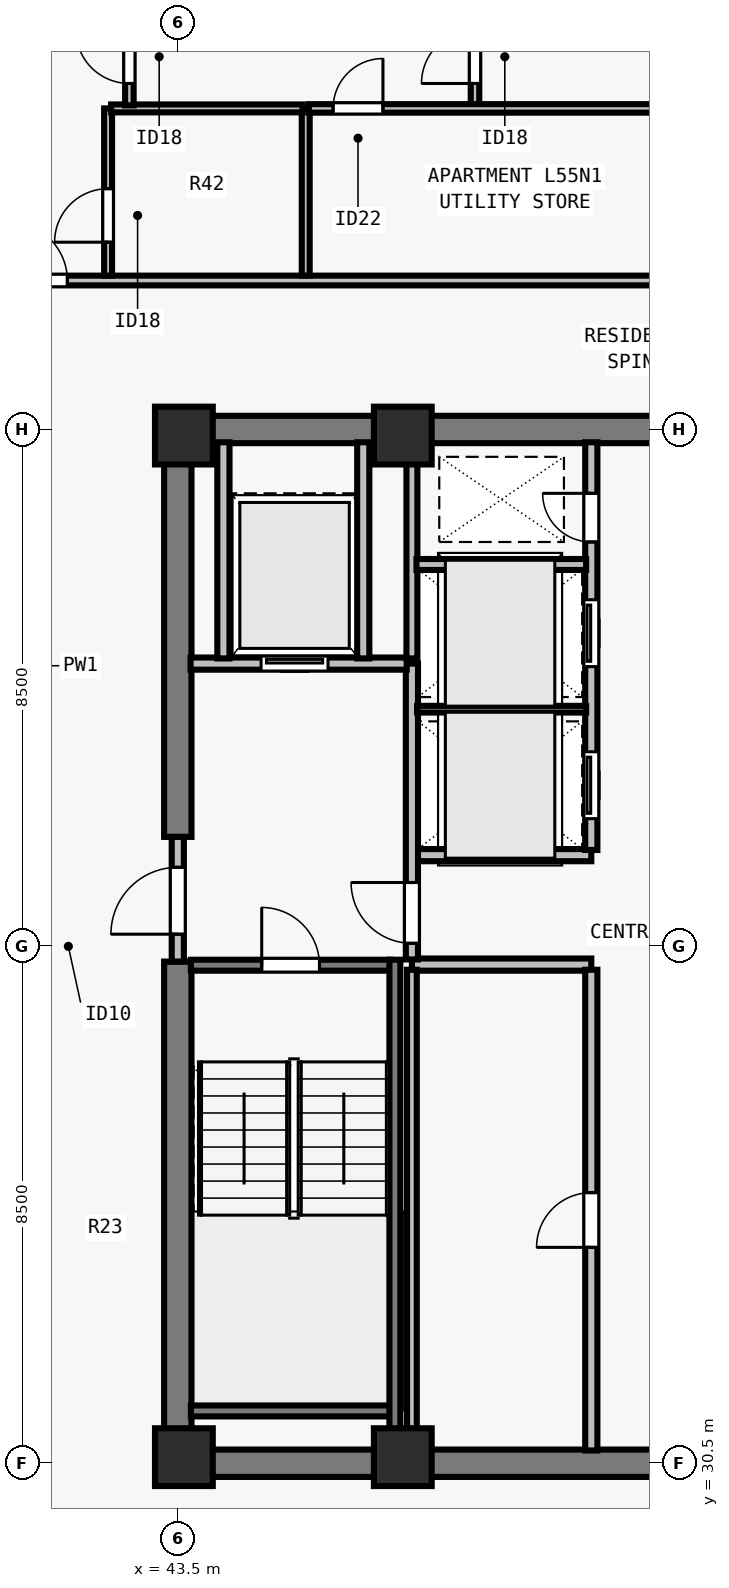
"""IFC4 building model, lengths in metres.
Left out: names, types, materials, properties, quantities, classifications, styles, units other than length and angle.
Written with IfcOpenShell. Run it as: python <this file> out.ifc"""

import sys

from ifc_helpers import new_model, si_unit, direction, frame, frame_2d, origin, origin_2d, place, context, subcontext, project, spatial, rectangle, extrude, element, fill, save


model = new_model("IFC4")
c1 = context("Model", 3, precision=1e-05, world=origin(), true_north=direction((0.0, 1.0)))
c2 = subcontext(c1, "Body", "Model", "MODEL_VIEW")
j1 = project(units=[si_unit("LENGTHUNIT", "METRE"), si_unit("PLANEANGLEUNIT", "RADIAN")], contexts=[c1])
p1 = place(None, origin())
s1 = spatial("IfcSite", under=j1, at=p1, CompositionType="ELEMENT")
p2 = place(p1, origin())
s2 = spatial("IfcBuilding", under=s1, at=p2, CompositionType="ELEMENT")
p3 = place(p2, frame((0.0, 0.0, 202.5)))
s3 = spatial("IfcBuildingStorey", under=s2, at=p3, CompositionType="ELEMENT", Elevation=202.5)
for number, where, z_axis, x_axis in (
    (1, (43.6, 30.6, 0.0), (0.0, 0.0, 1.0), (1.0, 0.0, 0.0)),
    (2, (47.2, 30.6, 0.0), (0.0, 0.0, 1.0), (1.0, 0.0, 0.0)),
    (3, (43.6, 47.4, 0.0), (0.0, 0.0, 1.0), (1.0, 0.0, 0.0)),
    (4, (47.2, 47.4, 0.0), (0.0, 0.0, 1.0), (1.0, 0.0, 0.0)),
):
    element("IfcColumn", number, at=place(p3, frame(where, z_axis=z_axis, x_axis=x_axis)), inside=s3, PredefinedType="COLUMN", context=c2, shape_type="SweptSolid", body=[
        extrude(rectangle(XDim=0.95, YDim=0.95, at=origin_2d()), origin(), (0.0, 0.0, 1.0), 3.5),
    ])
for number, where, z_axis, x_axis in (
    (5, (43.275, 30.5, 0.0), (0.0, 0.0, 1.0), (1.0, 0.0, 0.0)),
    (6, (43.275, 47.5, 0.0), (0.0, 0.0, 1.0), (1.0, 0.0, 0.0)),
):
    element("IfcWall", number, at=place(p3, frame(where, z_axis=z_axis, x_axis=x_axis)), inside=s3, PredefinedType="SHEAR", context=c2, shape_type="SweptSolid", body=[
        extrude(rectangle(XDim=17.45, YDim=0.45, at=frame_2d((8.725, 0.0))), origin(), (0.0, 0.0, 1.0), 3.29),
    ])
p4 = place(p3, frame((43.5, 30.715, 0.0), z_axis=(0.0, 0.0, 1.0), x_axis=(0.0, 1.0, 0.0)))
e7 = element("IfcWall", 7, at=p4, inside=s3, PredefinedType="SHEAR", context=c2, shape_type="SweptSolid", body=[
    extrude(rectangle(XDim=8.035, YDim=0.45, at=frame_2d((4.018, 0.0))), origin(), (0.0, 0.0, 1.0), 3.29),
])
p5 = place(p3, frame((43.5, 40.8, 0.0), z_axis=(0.0, 0.0, 1.0), x_axis=(0.0, 1.0, 0.0)))
e8 = element("IfcWall", 8, at=p5, inside=s3, PredefinedType="SHEAR", context=c2, shape_type="SweptSolid", body=[
    extrude(rectangle(XDim=6.485, YDim=0.45, at=frame_2d((3.242, 0.0))), origin(), (0.0, 0.0, 1.0), 3.29),
])
for number, where, z_axis, x_axis in (
    (9, (47.35, 38.7, 0.0), (0.0, 0.0, 1.0), (1.0, 0.0, 0.0)),
    (10, (47.35, 40.5, 0.0), (0.0, 0.0, 1.0), (1.0, 0.0, 0.0)),
):
    element("IfcWall", number, at=place(p3, frame(where, z_axis=z_axis, x_axis=x_axis)), inside=s3, PredefinedType="SOLIDWALL", context=c2, shape_type="SweptSolid", body=[
        extrude(rectangle(XDim=2.95, YDim=0.2, at=frame_2d((1.475, 0.0))), origin(), (0.0, 0.0, 1.0), 3.29),
    ])
p6 = place(p3, frame((50.3, 30.71, 0.0), z_axis=(0.0, 0.0, 1.0), x_axis=(0.0, 1.0, 0.0)))
e11 = element("IfcWall", 11, at=p6, inside=s3, PredefinedType="SOLIDWALL", context=c2, shape_type="SweptSolid", body=[
    extrude(rectangle(XDim=7.905, YDim=0.2, at=frame_2d((3.953, 0.0))), origin(), (0.0, 0.0, 1.0), 3.29),
])
p7 = place(p6, frame((3.34, 0.0, 0.0)))
e12 = element("IfcOpeningElement", 12, at=p7, cuts=e11, PredefinedType="OPENING", context=c2, shape_type="SweptSolid", body=[
    extrude(rectangle(XDim=0.9, YDim=2.12, at=frame_2d((0.45, 1.06))), frame((0.0, 0.11, 0.0), z_axis=(0.0, -1.0, 0.0), x_axis=(1.0, 0.0, 0.0)), (0.0, 0.0, 1.0), 0.22),
])
p8 = place(p3, frame((50.3, 40.585, 0.0), z_axis=(0.0, 0.0, 1.0), x_axis=(0.0, 1.0, 0.0)))
e13 = element("IfcWall", 13, at=p8, inside=s3, PredefinedType="SOLIDWALL", context=c2, shape_type="SweptSolid", body=[
    extrude(rectangle(XDim=6.705, YDim=0.2, at=frame_2d((3.353, 0.0))), origin(), (0.0, 0.0, 1.0), 3.29),
])
p9 = place(p8, frame((0.515, 0.0, 0.0)))
e14 = element("IfcOpeningElement", 14, at=p9, cuts=e13, PredefinedType="OPENING", context=c2, shape_type="SweptSolid", body=[
    extrude(rectangle(XDim=1.1, YDim=2.2, at=frame_2d((0.55, 1.1))), frame((0.0, 0.11, 0.0), z_axis=(0.0, -1.0, 0.0), x_axis=(1.0, 0.0, 0.0)), (0.0, 0.0, 1.0), 0.22),
])
p10 = place(p8, frame((3.015, 0.0, 0.0)))
e15 = element("IfcOpeningElement", 15, at=p10, cuts=e13, PredefinedType="OPENING", context=c2, shape_type="SweptSolid", body=[
    extrude(rectangle(XDim=1.1, YDim=2.2, at=frame_2d((0.55, 1.1))), frame((0.0, 0.11, 0.0), z_axis=(0.0, -1.0, 0.0), x_axis=(1.0, 0.0, 0.0)), (0.0, 0.0, 1.0), 0.22),
])
p11 = place(p8, frame((5.065, 0.0, 0.0)))
e16 = element("IfcOpeningElement", 16, at=p11, cuts=e13, PredefinedType="OPENING", context=c2, shape_type="SweptSolid", body=[
    extrude(rectangle(XDim=0.8, YDim=2.08, at=frame_2d((0.4, 1.04))), frame((0.0, 0.11, 0.0), z_axis=(0.0, -1.0, 0.0), x_axis=(1.0, 0.0, 0.0)), (0.0, 0.0, 1.0), 0.22),
])
p12 = place(p3, frame((43.5, 38.75, 0.0), z_axis=(0.0, 0.0, 1.0), x_axis=(0.0, 1.0, 0.0)))
e17 = element("IfcWall", 17, at=p12, inside=s3, PredefinedType="SOLIDWALL", context=c2, shape_type="SweptSolid", body=[
    extrude(rectangle(XDim=2.05, YDim=0.2, at=frame_2d((1.025, 0.0))), origin(), (0.0, 0.0, 1.0), 3.29),
])
p13 = place(p12, frame((0.45, 0.0, 0.0)))
e18 = element("IfcOpeningElement", 18, at=p13, cuts=e17, PredefinedType="OPENING", context=c2, shape_type="SweptSolid", body=[
    extrude(rectangle(XDim=1.1, YDim=2.15, at=frame_2d((0.55, 1.075))), frame((0.0, 0.11, 0.0), z_axis=(0.0, -1.0, 0.0), x_axis=(1.0, 0.0, 0.0)), (0.0, 0.0, 1.0), 0.22),
])
p14 = place(p3, frame((47.35, 38.785, 0.0), z_axis=(0.0, 0.0, 1.0), x_axis=(0.0, 1.0, 0.0)))
e19 = element("IfcWall", 19, at=p14, inside=s3, PredefinedType="SOLIDWALL", context=c2, shape_type="SweptSolid", body=[
    extrude(rectangle(XDim=4.865, YDim=0.2, at=frame_2d((2.433, 0.0))), origin(), (0.0, 0.0, 1.0), 3.29),
])
p15 = place(p14, frame((0.265, 0.0, 0.0)))
e20 = element("IfcOpeningElement", 20, at=p15, cuts=e19, PredefinedType="OPENING", context=c2, shape_type="SweptSolid", body=[
    extrude(rectangle(XDim=1.0, YDim=2.15, at=frame_2d((0.5, 1.075))), frame((0.0, 0.11, 0.0), z_axis=(0.0, -1.0, 0.0), x_axis=(1.0, 0.0, 0.0)), (0.0, 0.0, 1.0), 0.22),
])
p16 = place(p3, frame((43.71, 43.65, 0.0), z_axis=(0.0, 0.0, 1.0), x_axis=(1.0, 0.0, 0.0)))
e21 = element("IfcWall", 21, at=p16, inside=s3, PredefinedType="SOLIDWALL", context=c2, shape_type="SweptSolid", body=[
    extrude(rectangle(XDim=3.555, YDim=0.2, at=frame_2d((1.777, 0.0))), origin(), (0.0, 0.0, 1.0), 3.29),
])
p17 = place(p16, frame((1.16, 0.0, 0.0)))
e22 = element("IfcOpeningElement", 22, at=p17, cuts=e21, PredefinedType="OPENING", context=c2, shape_type="SweptSolid", body=[
    extrude(rectangle(XDim=1.1, YDim=2.2, at=frame_2d((0.55, 1.1))), frame((0.0, 0.11, 0.0), z_axis=(0.0, -1.0, 0.0), x_axis=(1.0, 0.0, 0.0)), (0.0, 0.0, 1.0), 0.22),
])
for number, where, z_axis, x_axis in (
    (23, (46.55, 43.735, 0.0), (0.0, 0.0, 1.0), (0.0, 1.0, 0.0)),
    (24, (44.25, 43.735, 0.0), (0.0, 0.0, 1.0), (0.0, 1.0, 0.0)),
):
    element("IfcWall", number, at=place(p3, frame(where, z_axis=z_axis, x_axis=x_axis)), inside=s3, PredefinedType="SOLIDWALL", context=c2, shape_type="SweptSolid", body=[
        extrude(rectangle(XDim=3.555, YDim=0.2, at=frame_2d((1.777, 0.0))), origin(), (0.0, 0.0, 1.0), 3.29),
    ])
p18 = place(p3, frame((47.35, 30.71, 0.0), z_axis=(0.0, 0.0, 1.0), x_axis=(0.0, 1.0, 0.0)))
e25 = element("IfcWall", 25, at=p18, inside=s3, PredefinedType="PARTITIONING", context=c2, shape_type="SweptSolid", body=[
    extrude(rectangle(XDim=7.905, YDim=0.16, at=frame_2d((3.953, 0.0))), origin(), (0.0, 0.0, 1.0), 3.29),
])
p19 = place(p3, frame((47.35, 43.735, 0.0), z_axis=(0.0, 0.0, 1.0), x_axis=(0.0, 1.0, 0.0)))
e26 = element("IfcWall", 26, at=p19, inside=s3, PredefinedType="SOLIDWALL", context=c2, shape_type="SweptSolid", body=[
    extrude(rectangle(XDim=3.555, YDim=0.18, at=frame_2d((1.777, 0.0))), origin(), (0.0, 0.0, 1.0), 3.29),
])
p20 = place(p3, frame((47.435, 42.9, 0.0), z_axis=(0.0, 0.0, 1.0), x_axis=(1.0, 0.0, 0.0)))
e27 = element("IfcWall", 27, at=p20, inside=s3, PredefinedType="PARTITIONING", context=c2, shape_type="SweptSolid", body=[
    extrude(rectangle(XDim=2.78, YDim=0.11, at=frame_2d((1.39, 0.0))), origin(), (0.0, 0.0, 1.0), 3.29),
])
p21 = place(p3, frame((47.425, 45.28, 0.0), z_axis=(0.0, 0.0, 1.0), x_axis=(1.0, 0.0, 0.0)))
e28 = element("IfcWall", 28, at=p21, inside=s3, PredefinedType="SOLIDWALL", context=c2, shape_type="SweptSolid", body=[
    extrude(rectangle(XDim=2.79, YDim=0.18, at=frame_2d((1.395, 0.0))), origin(), (0.0, 0.0, 1.0), 3.29),
])
p22 = place(p3, frame((29.805, 49.95, 0.0), z_axis=(0.0, 0.0, 1.0), x_axis=(1.0, 0.0, 0.0)))
e29 = element("IfcWall", 29, at=p22, inside=s3, PredefinedType="PARTITIONING", context=c2, shape_type="SweptSolid", body=[
    extrude(rectangle(XDim=44.39, YDim=0.16, at=frame_2d((22.195, 0.0))), origin(), (0.0, 0.0, 1.0), 2.958),
])
p23 = place(p22, frame((10.919, 0.0, 0.0)))
e30 = element("IfcOpeningElement", 30, at=p23, cuts=e29, PredefinedType="OPENING", context=c2, shape_type="SweptSolid", body=[
    extrude(rectangle(XDim=0.96, YDim=2.18, at=frame_2d((0.48, 1.09))), frame((0.0, 0.09, 0.0), z_axis=(0.0, -1.0, 0.0), x_axis=(1.0, 0.0, 0.0)), (0.0, 0.0, 1.0), 0.18),
])
p24 = place(p22, frame((32.999, 0.0, 0.0)))
e31 = element("IfcOpeningElement", 31, at=p24, cuts=e29, PredefinedType="OPENING", context=c2, shape_type="SweptSolid", body=[
    extrude(rectangle(XDim=0.96, YDim=2.18, at=frame_2d((0.48, 1.09))), frame((0.0, 0.09, 0.0), z_axis=(0.0, -1.0, 0.0), x_axis=(1.0, 0.0, 0.0)), (0.0, 0.0, 1.0), 0.18),
])
p25 = place(p3, frame((45.604, 50.03, 0.0), z_axis=(0.0, 0.0, 1.0), x_axis=(0.0, 1.0, 0.0)))
e32 = element("IfcWall", 32, at=p25, inside=s3, PredefinedType="PLUMBINGWALL", context=c2, shape_type="SweptSolid", body=[
    extrude(rectangle(XDim=2.75, YDim=0.13, at=frame_2d((1.375, 0.0))), origin(), (0.0, 0.0, 1.0), 3.29),
])
p26 = place(p3, frame((42.354, 50.03, 0.0), z_axis=(0.0, 0.0, 1.0), x_axis=(0.0, 1.0, 0.0)))
e33 = element("IfcWall", 33, at=p26, inside=s3, PredefinedType="PLUMBINGWALL", context=c2, shape_type="SweptSolid", body=[
    extrude(rectangle(XDim=2.75, YDim=0.13, at=frame_2d((1.375, 0.0))), origin(), (0.0, 0.0, 1.0), 3.29),
])
p27 = place(p26, frame((0.55, 0.0, 0.0)))
e34 = element("IfcOpeningElement", 34, at=p27, cuts=e33, PredefinedType="OPENING", context=c2, shape_type="SweptSolid", body=[
    extrude(rectangle(XDim=0.88, YDim=2.1, at=frame_2d((0.44, 1.05))), frame((0.0, 0.075, 0.0), z_axis=(0.0, -1.0, 0.0), x_axis=(1.0, 0.0, 0.0)), (0.0, 0.0, 1.0), 0.15),
])
p28 = place(p3, frame((42.404, 52.78, 0.0), z_axis=(0.0, 0.0, 1.0), x_axis=(1.0, 0.0, 0.0)))
e35 = element("IfcWall", 35, at=p28, inside=s3, PredefinedType="PLUMBINGWALL", context=c2, shape_type="SweptSolid", body=[
    extrude(rectangle(XDim=3.15, YDim=0.13, at=frame_2d((1.575, 0.0))), origin(), (0.0, 0.0, 1.0), 3.29),
])
p29 = place(p3, frame((48.387, 52.74, 0.0), z_axis=(0.0, 0.0, 1.0), x_axis=(0.0, 1.0, 0.0)))
e36 = element("IfcWall", 36, at=p29, inside=s3, PredefinedType="PARTITIONING", context=c2, shape_type="SweptSolid", body=[
    extrude(rectangle(XDim=8.38, YDim=0.14, at=frame_2d((4.19, 0.0))), origin(), (0.0, 0.0, 1.0), 3.29),
])
p30 = place(p29, frame((0.45, 0.0, 0.0)))
e37 = element("IfcOpeningElement", 37, at=p30, cuts=e36, PredefinedType="OPENING", context=c2, shape_type="SweptSolid", body=[
    extrude(rectangle(XDim=0.88, YDim=2.1, at=frame_2d((0.44, 1.05))), frame((0.0, 0.08, 0.0), z_axis=(0.0, -1.0, 0.0), x_axis=(1.0, 0.0, 0.0)), (0.0, 0.0, 1.0), 0.16),
])
p31 = place(p3, frame((45.654, 52.78, 0.0), z_axis=(0.0, 0.0, 1.0), x_axis=(1.0, 0.0, 0.0)))
e38 = element("IfcWall", 38, at=p31, inside=s3, PredefinedType="PARTITIONING", context=c2, shape_type="SweptSolid", body=[
    extrude(rectangle(XDim=6.884, YDim=0.14, at=frame_2d((3.442, 0.0))), origin(), (0.0, 0.0, 1.0), 3.29),
])
p32 = place(p31, frame((0.4, 0.0, 0.0)))
e39 = element("IfcOpeningElement", 39, at=p32, cuts=e38, PredefinedType="OPENING", context=c2, shape_type="SweptSolid", body=[
    extrude(rectangle(XDim=0.82, YDim=2.1, at=frame_2d((0.41, 1.05))), frame((0.0, 0.08, 0.0), z_axis=(0.0, -1.0, 0.0), x_axis=(1.0, 0.0, 0.0)), (0.0, 0.0, 1.0), 0.16),
])
p33 = place(p3, frame((42.704, 52.83, 0.0), z_axis=(0.0, 0.0, 1.0), x_axis=(0.0, 1.0, 0.0)))
e40 = element("IfcWall", 40, at=p33, inside=s3, PredefinedType="PARTITIONING", context=c2, shape_type="SweptSolid", body=[
    extrude(rectangle(XDim=8.29, YDim=0.14, at=frame_2d((4.145, 0.0))), origin(), (0.0, 0.0, 1.0), 3.29),
])
p34 = place(p33, frame((0.36, 0.0, 0.0)))
e41 = element("IfcOpeningElement", 41, at=p34, cuts=e40, PredefinedType="OPENING", context=c2, shape_type="SweptSolid", body=[
    extrude(rectangle(XDim=0.88, YDim=2.1, at=frame_2d((0.44, 1.05))), frame((0.0, 0.08, 0.0), z_axis=(0.0, -1.0, 0.0), x_axis=(1.0, 0.0, 0.0)), (0.0, 0.0, 1.0), 0.16),
])
p35 = place(p3, frame((43.715, 38.69, 0.0), z_axis=(0.0, 0.0, 1.0), x_axis=(1.0, 0.0, 0.0)))
e42 = element("IfcWall", 42, at=p35, inside=s3, PredefinedType="SOLIDWALL", context=c2, shape_type="SweptSolid", body=[
    extrude(rectangle(XDim=3.28, YDim=0.18, at=frame_2d((1.64, 0.0))), origin(), (0.0, 0.0, 1.0), 3.29),
])
p36 = place(p35, frame((1.165, 0.0, 0.0)))
e43 = element("IfcOpeningElement", 43, at=p36, cuts=e42, PredefinedType="OPENING", context=c2, shape_type="SweptSolid", body=[
    extrude(rectangle(XDim=0.95, YDim=2.15, at=frame_2d((0.475, 1.075))), frame((0.0, 0.1, 0.0), z_axis=(0.0, -1.0, 0.0), x_axis=(1.0, 0.0, 0.0)), (0.0, 0.0, 1.0), 0.2),
])
p37 = place(p3, frame((43.715, 31.36, 0.0), z_axis=(0.0, 0.0, 1.0), x_axis=(1.0, 0.0, 0.0)))
e44 = element("IfcWall", 44, at=p37, inside=s3, PredefinedType="SOLIDWALL", context=c2, shape_type="SweptSolid", body=[
    extrude(rectangle(XDim=3.28, YDim=0.18, at=frame_2d((1.64, 0.0))), origin(), (0.0, 0.0, 1.0), 3.29),
])
p38 = place(p3, frame((47.07, 38.78, 0.0), z_axis=(0.0, 0.0, 1.0), x_axis=(0.0, -1.0, 0.0)))
e45 = element("IfcWall", 45, at=p38, inside=s3, PredefinedType="SOLIDWALL", context=c2, shape_type="SweptSolid", body=[
    extrude(rectangle(XDim=8.067, YDim=0.18, at=frame_2d((4.034, 0.0))), origin(), (0.0, 0.0, 1.0), 3.29),
])
p39 = place(p13, origin())
e46 = element("IfcDoor", 46, at=p39, inside=s3, OperationType="SINGLE_SWING_LEFT", PredefinedType="DOOR", context=c2, shape_type="SweptSolid", body=[
    extrude(rectangle(XDim=1.1, YDim=2.15, at=frame_2d((0.55, 1.075))), frame((0.0, 0.025, 0.0), z_axis=(0.0, -1.0, 0.0), x_axis=(1.0, 0.0, 0.0)), (0.0, 0.0, 1.0), 0.05),
])
fill(e18, e46)
p40 = place(p15, origin())
e47 = element("IfcDoor", 47, at=p40, inside=s3, OperationType="SINGLE_SWING_RIGHT", PredefinedType="DOOR", context=c2, shape_type="SweptSolid", body=[
    extrude(rectangle(XDim=1.0, YDim=2.15, at=frame_2d((0.5, 1.075))), frame((0.0, 0.025, 0.0), z_axis=(0.0, -1.0, 0.0), x_axis=(1.0, 0.0, 0.0)), (0.0, 0.0, 1.0), 0.05),
])
fill(e20, e47)
p41 = place(p17, origin())
e48 = element("IfcDoor", 48, at=p41, inside=s3, OperationType="SLIDING_TO_LEFT", PredefinedType="DOOR", context=c2, shape_type="SweptSolid", body=[
    extrude(rectangle(XDim=1.1, YDim=2.2, at=frame_2d((0.55, 1.1))), frame((0.0, 0.025, 0.0), z_axis=(0.0, -1.0, 0.0), x_axis=(1.0, 0.0, 0.0)), (0.0, 0.0, 1.0), 0.05),
])
fill(e22, e48)
p42 = place(p7, origin())
e49 = element("IfcDoor", 49, at=p42, inside=s3, OperationType="SINGLE_SWING_LEFT", PredefinedType="DOOR", context=c2, shape_type="SweptSolid", body=[
    extrude(rectangle(XDim=0.9, YDim=2.12, at=frame_2d((0.45, 1.06))), frame((0.0, 0.025, 0.0), z_axis=(0.0, -1.0, 0.0), x_axis=(1.0, 0.0, 0.0)), (0.0, 0.0, 1.0), 0.05),
])
fill(e12, e49)
p43 = place(p9, origin())
e50 = element("IfcDoor", 50, at=p43, inside=s3, OperationType="SLIDING_TO_LEFT", PredefinedType="DOOR", context=c2, shape_type="SweptSolid", body=[
    extrude(rectangle(XDim=1.1, YDim=2.2, at=frame_2d((0.55, 1.1))), frame((0.0, 0.025, 0.0), z_axis=(0.0, -1.0, 0.0), x_axis=(1.0, 0.0, 0.0)), (0.0, 0.0, 1.0), 0.05),
])
fill(e14, e50)
p44 = place(p10, origin())
e51 = element("IfcDoor", 51, at=p44, inside=s3, OperationType="SLIDING_TO_LEFT", PredefinedType="DOOR", context=c2, shape_type="SweptSolid", body=[
    extrude(rectangle(XDim=1.1, YDim=2.2, at=frame_2d((0.55, 1.1))), frame((0.0, 0.025, 0.0), z_axis=(0.0, -1.0, 0.0), x_axis=(1.0, 0.0, 0.0)), (0.0, 0.0, 1.0), 0.05),
])
fill(e15, e51)
p45 = place(p11, origin())
e52 = element("IfcDoor", 52, at=p45, inside=s3, OperationType="SINGLE_SWING_RIGHT", PredefinedType="DOOR", context=c2, shape_type="SweptSolid", body=[
    extrude(rectangle(XDim=0.8, YDim=2.08, at=frame_2d((0.4, 1.04))), frame((0.0, 0.025, 0.0), z_axis=(0.0, -1.0, 0.0), x_axis=(1.0, 0.0, 0.0)), (0.0, 0.0, 1.0), 0.05),
])
fill(e16, e52)
p46 = place(p27, origin())
e53 = element("IfcDoor", 53, at=p46, inside=s3, OperationType="SINGLE_SWING_LEFT", PredefinedType="DOOR", context=c2, shape_type="SweptSolid", body=[
    extrude(rectangle(XDim=0.88, YDim=2.1, at=frame_2d((0.44, 1.05))), frame((0.0, 0.025, 0.0), z_axis=(0.0, -1.0, 0.0), x_axis=(1.0, 0.0, 0.0)), (0.0, 0.0, 1.0), 0.05),
])
fill(e34, e53)
p47 = place(p32, origin())
e54 = element("IfcDoor", 54, at=p47, inside=s3, OperationType="SINGLE_SWING_RIGHT", PredefinedType="DOOR", context=c2, shape_type="SweptSolid", body=[
    extrude(rectangle(XDim=0.82, YDim=2.1, at=frame_2d((0.41, 1.05))), frame((0.0, 0.025, 0.0), z_axis=(0.0, -1.0, 0.0), x_axis=(1.0, 0.0, 0.0)), (0.0, 0.0, 1.0), 0.05),
])
fill(e39, e54)
p48 = place(p30, origin())
e55 = element("IfcDoor", 55, at=p48, inside=s3, OperationType="SINGLE_SWING_LEFT", PredefinedType="DOOR", context=c2, shape_type="SweptSolid", body=[
    extrude(rectangle(XDim=0.88, YDim=2.1, at=frame_2d((0.44, 1.05))), frame((0.0, 0.025, 0.0), z_axis=(0.0, -1.0, 0.0), x_axis=(1.0, 0.0, 0.0)), (0.0, 0.0, 1.0), 0.05),
])
fill(e37, e55)
p49 = place(p34, origin())
e56 = element("IfcDoor", 56, at=p49, inside=s3, OperationType="SINGLE_SWING_RIGHT", PredefinedType="DOOR", context=c2, shape_type="SweptSolid", body=[
    extrude(rectangle(XDim=0.88, YDim=2.1, at=frame_2d((0.44, 1.05))), frame((0.0, 0.025, 0.0), z_axis=(0.0, -1.0, 0.0), x_axis=(1.0, 0.0, 0.0)), (0.0, 0.0, 1.0), 0.05),
])
fill(e41, e56)
p50 = place(p23, origin())
e57 = element("IfcDoor", 57, at=p50, inside=s3, OperationType="SINGLE_SWING_LEFT", PredefinedType="DOOR", context=c2, shape_type="SweptSolid", body=[
    extrude(rectangle(XDim=0.96, YDim=2.18, at=frame_2d((0.48, 1.09))), frame((0.0, 0.025, 0.0), z_axis=(0.0, -1.0, 0.0), x_axis=(1.0, 0.0, 0.0)), (0.0, 0.0, 1.0), 0.05),
])
fill(e30, e57)
p51 = place(p36, origin())
e58 = element("IfcDoor", 58, at=p51, inside=s3, OperationType="SINGLE_SWING_LEFT", PredefinedType="DOOR", context=c2, shape_type="SweptSolid", body=[
    extrude(rectangle(XDim=0.95, YDim=2.15, at=frame_2d((0.475, 1.075))), frame((0.0, 0.025, 0.0), z_axis=(0.0, -1.0, 0.0), x_axis=(1.0, 0.0, 0.0)), (0.0, 0.0, 1.0), 0.05),
])
fill(e43, e58)
save(model, sys.argv[1])
